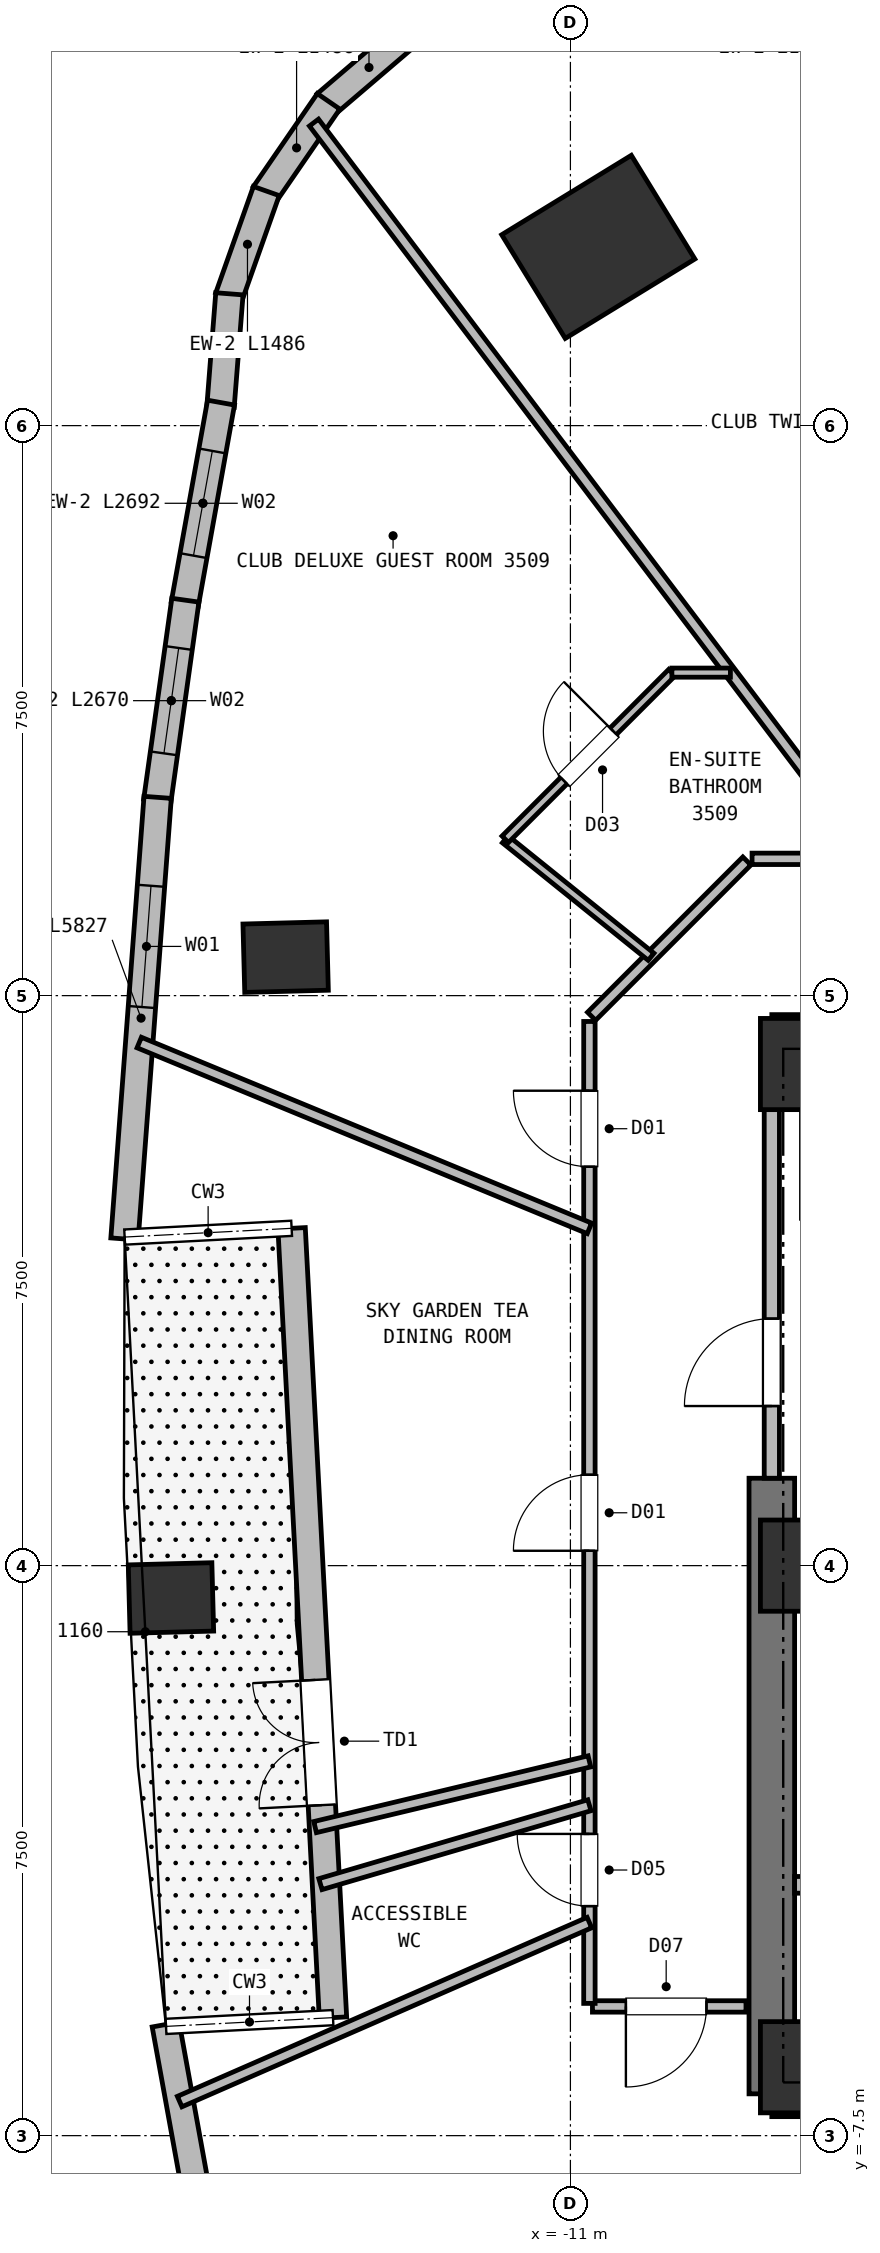
"""IFC4 building model, lengths in metres.
Left out: names, types, materials, properties, quantities, classifications, styles, units other than length and angle.
Written with IfcOpenShell. Run it as: python <this file> out.ifc"""

import sys

from ifc_helpers import new_model, si_unit, direction, frame, frame_2d, origin, origin_2d, place, context, subcontext, project, spatial, rectangle, extrude, element, fill, save


model = new_model("IFC4")
c1 = context("Model", 3, precision=1e-05, world=origin(), true_north=direction((0.0, 1.0)))
c2 = subcontext(c1, "Body", "Model", "MODEL_VIEW")
j1 = project(units=[si_unit("LENGTHUNIT", "METRE"), si_unit("PLANEANGLEUNIT", "RADIAN")], contexts=[c1])
p1 = place(None, origin())
s1 = spatial("IfcSite", under=j1, at=p1, CompositionType="ELEMENT")
p2 = place(p1, origin())
s2 = spatial("IfcBuilding", under=s1, at=p2, CompositionType="ELEMENT")
p3 = place(p2, frame((0.0, 0.0, 131.0)))
s3 = spatial("IfcBuildingStorey", under=s2, at=p3, CompositionType="ELEMENT", Elevation=131.0)
for number, where, z_axis, x_axis in (
    (1, (-8.0, -6.6, 0.0), (0.0, 0.0, 1.0), (1.0, 0.0, 0.0)),
    (2, (-8.0, 6.6, 0.0), (0.0, 0.0, 1.0), (1.0, 0.0, 0.0)),
    (3, (-8.0, 0.0, 0.0), (0.0, 0.0, 1.0), (1.0, 0.0, 0.0)),
):
    element("IfcColumn", number, at=place(p3, frame(where, z_axis=z_axis, x_axis=x_axis)), inside=s3, PredefinedType="COLUMN", context=c2, shape_type="SweptSolid", body=[
        extrude(rectangle(XDim=1.0, YDim=1.2, at=origin_2d()), origin(), (0.0, 0.0, 1.0), 3.75),
    ])
p4 = place(p3, frame((-8.35, 6.95, 0.0), z_axis=(0.0, 0.0, 1.0), x_axis=(1.0, 0.0, 0.0)))
e4 = element("IfcWall", 4, at=p4, inside=s3, PredefinedType="SHEAR", context=c2, shape_type="SweptSolid", body=[
    extrude(rectangle(XDim=16.7, YDim=0.6, at=frame_2d((8.35, 0.0))), origin(), (0.0, 0.0, 1.0), 3.5),
])
p5 = place(p3, frame((-8.35, -6.95, 0.0), z_axis=(0.0, 0.0, 1.0), x_axis=(1.0, 0.0, 0.0)))
e5 = element("IfcWall", 5, at=p5, inside=s3, PredefinedType="SHEAR", context=c2, shape_type="SweptSolid", body=[
    extrude(rectangle(XDim=3.95, YDim=0.6, at=frame_2d((1.975, 0.0))), origin(), (0.0, 0.0, 1.0), 3.5),
])
p6 = place(p3, frame((-8.35, -6.95, 0.0), z_axis=(0.0, 0.0, 1.0), x_axis=(0.0, 1.0, 0.0)))
e6 = element("IfcWall", 6, at=p6, inside=s3, PredefinedType="SHEAR", context=c2, shape_type="SweptSolid", body=[
    extrude(rectangle(XDim=8.1, YDim=0.6, at=frame_2d((4.05, 0.0))), origin(), (0.0, 0.0, 1.0), 3.5),
])
p7 = place(p3, frame((-10.633, 17.352, 0.0), z_axis=(0.0, 0.0, 1.0), x_axis=(-0.522498564716, 0.852640164354, 0.0)))
e7 = element("IfcColumn", 7, at=p7, inside=s3, PredefinedType="COLUMN", context=c2, shape_type="SweptSolid", body=[
    extrude(rectangle(XDim=1.6, YDim=2.0, at=origin_2d()), origin(), (0.0, 0.0, 1.0), 3.75),
])
for number, where, z_axis, x_axis in (
    (8, (-14.747, 8.007, 0.0), (0.0, 0.0, 1.0), (-0.026, 1.0, 0.0)),
    (9, (-16.255, -0.426, 0.0), (0.0, 0.0, 1.0), (-0.026, 1.0, 0.0)),
):
    element("IfcColumn", number, at=place(p3, frame(where, z_axis=z_axis, x_axis=x_axis)), inside=s3, PredefinedType="COLUMN", context=c2, shape_type="SweptSolid", body=[
        extrude(rectangle(XDim=0.9, YDim=1.1, at=origin_2d()), origin(), (0.0, 0.0, 1.0), 3.75),
    ])
p8 = place(p3, frame((-14.124, -5.947, 0.0), z_axis=(0.0, 0.0, 1.0), x_axis=(-0.052325961458, 0.998630058509, 0.0)))
e10 = element("IfcWall", 10, at=p8, inside=s3, PredefinedType="SOLIDWALL", context=c2, shape_type="SweptSolid", body=[
    extrude(rectangle(XDim=10.4, YDim=0.36, at=frame_2d((5.2, 0.0))), origin(), (0.0, 0.0, 1.0), 3.5),
])
p9 = place(p8, frame((2.8, 0.0, 0.0)))
e11 = element("IfcOpeningElement", 11, at=p9, cuts=e10, PredefinedType="OPENING", context=c2, shape_type="SweptSolid", body=[
    extrude(rectangle(XDim=1.65, YDim=2.25, at=frame_2d((0.825, 1.125))), frame((0.0, 0.19, 0.0), z_axis=(0.0, -1.0, 0.0), x_axis=(1.0, 0.0, 0.0)), (0.0, 0.0, 1.0), 0.38),
])
p10 = place(p3, frame((-14.215, 19.23, 0.0), z_axis=(0.0, 0.0, 1.0), x_axis=(0.760461582144, 0.649382924078, 0.0)))
e12 = element("IfcWall", 12, at=p10, inside=s3, PredefinedType="SOLIDWALL", context=c2, shape_type="SweptSolid", body=[
    extrude(rectangle(XDim=1.486, YDim=0.36, at=frame_2d((0.743, 0.0))), origin(), (0.0, 0.0, 1.0), 3.5),
])
p11 = place(p3, frame((-15.023, 18.042, 0.0), z_axis=(0.0, 0.0, 1.0), x_axis=(0.566438155808, 0.824104250472, 0.0)))
e13 = element("IfcWall", 13, at=p11, inside=s3, PredefinedType="SOLIDWALL", context=c2, shape_type="SweptSolid", body=[
    extrude(rectangle(XDim=1.486, YDim=0.36, at=frame_2d((0.743, 0.0))), origin(), (0.0, 0.0, 1.0), 3.5),
])
p12 = place(p3, frame((-15.497, 16.686, 0.0), z_axis=(0.0, 0.0, 1.0), x_axis=(0.333670746008, 0.942689680254, 0.0)))
e14 = element("IfcWall", 14, at=p12, inside=s3, PredefinedType="SOLIDWALL", context=c2, shape_type="SweptSolid", body=[
    extrude(rectangle(XDim=1.486, YDim=0.36, at=frame_2d((0.743, 0.0))), origin(), (0.0, 0.0, 1.0), 3.5),
])
p13 = place(p3, frame((-15.603, 15.253, 0.0), z_axis=(0.0, 0.0, 1.0), x_axis=(0.078393018091, 0.996922531952, 0.0)))
e15 = element("IfcWall", 15, at=p13, inside=s3, PredefinedType="SOLIDWALL", context=c2, shape_type="SweptSolid", body=[
    extrude(rectangle(XDim=1.486, YDim=0.36, at=frame_2d((0.743, 0.0))), origin(), (0.0, 0.0, 1.0), 3.5),
])
p14 = place(p3, frame((-16.073, 12.654, 0.0), z_axis=(0.0, 0.0, 1.0), x_axis=(0.177152998315, 0.984183323974, 0.0)))
e16 = element("IfcWall", 16, at=p14, inside=s3, PredefinedType="SOLIDWALL", context=c2, shape_type="SweptSolid", body=[
    extrude(rectangle(XDim=2.691, YDim=0.36, at=frame_2d((1.346, 0.0))), origin(), (0.0, 0.0, 1.0), 3.5),
])
p15 = place(p14, frame((0.646, 0.0, 0.72)))
e17 = element("IfcOpeningElement", 17, at=p15, cuts=e16, PredefinedType="OPENING", context=c2, shape_type="SweptSolid", body=[
    extrude(rectangle(XDim=1.4, YDim=1.84, at=frame_2d((0.7, 0.92))), frame((0.0, 0.19, 0.0), z_axis=(0.0, -1.0, 0.0), x_axis=(1.0, 0.0, 0.0)), (0.0, 0.0, 1.0), 0.38),
])
p16 = place(p3, frame((-16.436, 10.059, 0.0), z_axis=(0.0, 0.0, 1.0), x_axis=(0.138719592598, 0.990331699296, 0.0)))
e18 = element("IfcWall", 18, at=p16, inside=s3, PredefinedType="SOLIDWALL", context=c2, shape_type="SweptSolid", body=[
    extrude(rectangle(XDim=2.67, YDim=0.36, at=frame_2d((1.335, 0.0))), origin(), (0.0, 0.0, 1.0), 3.5),
])
p17 = place(p16, frame((0.635, 0.0, 0.72)))
e19 = element("IfcOpeningElement", 19, at=p17, cuts=e18, PredefinedType="OPENING", context=c2, shape_type="SweptSolid", body=[
    extrude(rectangle(XDim=1.4, YDim=1.84, at=frame_2d((0.7, 0.92))), frame((0.0, 0.19, 0.0), z_axis=(0.0, -1.0, 0.0), x_axis=(1.0, 0.0, 0.0)), (0.0, 0.0, 1.0), 0.38),
])
p18 = place(p3, frame((-16.867, 4.298, 0.0), z_axis=(0.0, 0.0, 1.0), x_axis=(0.074873276991, 0.997193056731, 0.0)))
e20 = element("IfcWall", 20, at=p18, inside=s3, PredefinedType="SOLIDWALL", context=c2, shape_type="SweptSolid", body=[
    extrude(rectangle(XDim=5.827, YDim=0.36, at=frame_2d((2.914, 0.0))), origin(), (0.0, 0.0, 1.0), 3.5),
])
p19 = place(p18, frame((3.06, 0.0, 0.72)))
e21 = element("IfcOpeningElement", 21, at=p19, cuts=e20, PredefinedType="OPENING", context=c2, shape_type="SweptSolid", body=[
    extrude(rectangle(XDim=1.6, YDim=1.88, at=frame_2d((0.8, 0.94))), frame((0.0, 0.19, 0.0), z_axis=(0.0, -1.0, 0.0), x_axis=(1.0, 0.0, 0.0)), (0.0, 0.0, 1.0), 0.38),
])
p20 = place(p3, frame((-15.284, -11.771, 0.0), z_axis=(0.0, 0.0, 1.0), x_axis=(-0.178697394158, 0.983904081362, 0.0)))
e22 = element("IfcWall", 22, at=p20, inside=s3, PredefinedType="SOLIDWALL", context=c2, shape_type="SweptSolid", body=[
    extrude(rectangle(XDim=5.827, YDim=0.36, at=frame_2d((2.914, 0.0))), origin(), (0.0, 0.0, 1.0), 3.5),
])
p21 = place(p20, frame((2.113, 0.0, 0.72)))
e23 = element("IfcOpeningElement", 23, at=p21, cuts=e22, PredefinedType="OPENING", context=c2, shape_type="SweptSolid", body=[
    extrude(rectangle(XDim=1.6, YDim=1.88, at=frame_2d((0.8, 0.94))), frame((0.0, 0.19, 0.0), z_axis=(0.0, -1.0, 0.0), x_axis=(1.0, 0.0, 0.0)), (0.0, 0.0, 1.0), 0.38),
])
p22 = place(p3, frame((-8.05, -4.2, 0.0), z_axis=(0.0, 0.0, 1.0), x_axis=(1.0, 0.0, 0.0)))
e24 = element("IfcWall", 24, at=p22, inside=s3, PredefinedType="PARTITIONING", context=c2, shape_type="SweptSolid", body=[
    extrude(rectangle(XDim=0.96, YDim=0.22, at=frame_2d((0.48, 0.0))), origin(), (0.0, 0.0, 1.0), 3.5),
])
p23 = place(p3, frame((-8.35, 1.15, 0.0), z_axis=(0.0, 0.0, 1.0), x_axis=(0.0, 1.0, 0.0)))
e25 = element("IfcWall", 25, at=p23, inside=s3, PredefinedType="PARTITIONING", context=c2, shape_type="SweptSolid", body=[
    extrude(rectangle(XDim=5.4, YDim=0.2, at=frame_2d((2.7, 0.0))), origin(), (0.0, 0.0, 1.0), 3.5),
])
p24 = place(p23, frame((0.95, 0.0, 0.0)))
e26 = element("IfcOpeningElement", 26, at=p24, cuts=e25, PredefinedType="OPENING", context=c2, shape_type="SweptSolid", body=[
    extrude(rectangle(XDim=1.15, YDim=2.15, at=frame_2d((0.575, 1.075))), frame((0.0, 0.11, 0.0), z_axis=(0.0, -1.0, 0.0), x_axis=(1.0, 0.0, 0.0)), (0.0, 0.0, 1.0), 0.22),
])
p25 = place(p3, frame((-8.69, -5.8, 0.0), z_axis=(0.0, 0.0, 1.0), x_axis=(-1.0, 0.0, 0.0)))
e27 = element("IfcWall", 27, at=p25, inside=s3, PredefinedType="PARTITIONING", context=c2, shape_type="SweptSolid", body=[
    extrude(rectangle(XDim=2.02, YDim=0.15, at=frame_2d((1.01, 0.0))), origin(), (0.0, 0.0, 1.0), 3.5),
])
p26 = place(p25, frame((0.52, 0.0, 0.0)))
e28 = element("IfcOpeningElement", 28, at=p26, cuts=e27, PredefinedType="OPENING", context=c2, shape_type="SweptSolid", body=[
    extrude(rectangle(XDim=1.06, YDim=2.15, at=frame_2d((0.53, 1.075))), frame((0.0, 0.085, 0.0), z_axis=(0.0, -1.0, 0.0), x_axis=(1.0, 0.0, 0.0)), (0.0, 0.0, 1.0), 0.17),
])
p27 = place(p3, frame((-8.61, 9.3, 0.0), z_axis=(0.0, 0.0, 1.0), x_axis=(1.0, 0.0, 0.0)))
e29 = element("IfcWall", 29, at=p27, inside=s3, PredefinedType="PARTITIONING", context=c2, shape_type="SweptSolid", body=[
    extrude(rectangle(XDim=17.22, YDim=0.15, at=frame_2d((8.61, 0.0))), origin(), (0.0, 0.0, 1.0), 3.5),
])
p28 = place(p27, frame((11.156, 0.0, 0.0)))
e30 = element("IfcOpeningElement", 30, at=p28, cuts=e29, PredefinedType="OPENING", context=c2, shape_type="SweptSolid", body=[
    extrude(rectangle(XDim=1.0, YDim=2.15, at=frame_2d((0.5, 1.075))), frame((0.0, 0.085, 0.0), z_axis=(0.0, -1.0, 0.0), x_axis=(1.0, 0.0, 0.0)), (0.0, 0.0, 1.0), 0.17),
])
p29 = place(p27, frame((6.799, 0.0, 0.0)))
e31 = element("IfcOpeningElement", 31, at=p29, cuts=e29, PredefinedType="OPENING", context=c2, shape_type="SweptSolid", body=[
    extrude(rectangle(XDim=1.06, YDim=2.15, at=frame_2d((0.53, 1.075))), frame((0.0, 0.085, 0.0), z_axis=(0.0, -1.0, 0.0), x_axis=(1.0, 0.0, 0.0)), (0.0, 0.0, 1.0), 0.17),
])
p30 = place(p27, frame((1.737, 0.0, 0.0)))
e32 = element("IfcOpeningElement", 32, at=p30, cuts=e29, PredefinedType="OPENING", context=c2, shape_type="SweptSolid", body=[
    extrude(rectangle(XDim=1.06, YDim=2.15, at=frame_2d((0.53, 1.075))), frame((0.0, 0.085, 0.0), z_axis=(0.0, -1.0, 0.0), x_axis=(1.0, 0.0, 0.0)), (0.0, 0.0, 1.0), 0.17),
])
p31 = place(p27, frame((8.48, 0.0, 0.0)))
e33 = element("IfcOpeningElement", 33, at=p31, cuts=e29, PredefinedType="OPENING", context=c2, shape_type="SweptSolid", body=[
    extrude(rectangle(XDim=1.0, YDim=2.15, at=frame_2d((0.5, 1.075))), frame((0.0, 0.085, 0.0), z_axis=(0.0, -1.0, 0.0), x_axis=(1.0, 0.0, 0.0)), (0.0, 0.0, 1.0), 0.17),
])
p32 = place(p3, frame((-10.722, 7.228, 0.0), z_axis=(0.0, 0.0, 1.0), x_axis=(0.707106781187, 0.707106781187, 0.0)))
e34 = element("IfcWall", 34, at=p32, inside=s3, PredefinedType="PARTITIONING", context=c2, shape_type="SweptSolid", body=[
    extrude(rectangle(XDim=2.89, YDim=0.15, at=frame_2d((1.445, 0.0))), origin(), (0.0, 0.0, 1.0), 3.5),
])
p33 = place(p3, frame((-10.75, -5.76, 0.0), z_axis=(0.0, 0.0, 1.0), x_axis=(0.0, 1.0, 0.0)))
e35 = element("IfcWall", 35, at=p33, inside=s3, PredefinedType="PARTITIONING", context=c2, shape_type="SweptSolid", body=[
    extrude(rectangle(XDim=12.92, YDim=0.15, at=frame_2d((6.46, 0.0))), origin(), (0.0, 0.0, 1.0), 3.5),
])
p34 = place(p33, frame((1.28, 0.0, 0.0)))
e36 = element("IfcOpeningElement", 36, at=p34, cuts=e35, PredefinedType="OPENING", context=c2, shape_type="SweptSolid", body=[
    extrude(rectangle(XDim=0.95, YDim=2.1, at=frame_2d((0.475, 1.05))), frame((0.0, 0.085, 0.0), z_axis=(0.0, -1.0, 0.0), x_axis=(1.0, 0.0, 0.0)), (0.0, 0.0, 1.0), 0.17),
])
p35 = place(p33, frame((5.956, 0.0, 0.0)))
e37 = element("IfcOpeningElement", 37, at=p35, cuts=e35, PredefinedType="OPENING", context=c2, shape_type="SweptSolid", body=[
    extrude(rectangle(XDim=1.0, YDim=2.15, at=frame_2d((0.5, 1.075))), frame((0.0, 0.085, 0.0), z_axis=(0.0, -1.0, 0.0), x_axis=(1.0, 0.0, 0.0)), (0.0, 0.0, 1.0), 0.17),
])
p36 = place(p33, frame((11.009, 0.0, 0.0)))
e38 = element("IfcOpeningElement", 38, at=p36, cuts=e35, PredefinedType="OPENING", context=c2, shape_type="SweptSolid", body=[
    extrude(rectangle(XDim=1.0, YDim=2.15, at=frame_2d((0.5, 1.075))), frame((0.0, 0.085, 0.0), z_axis=(0.0, -1.0, 0.0), x_axis=(1.0, 0.0, 0.0)), (0.0, 0.0, 1.0), 0.17),
])
p37 = place(p3, frame((-10.75, -4.697, 0.0), z_axis=(0.0, 0.0, 1.0), x_axis=(-0.916368645406, -0.400335491452, 0.0)))
e39 = element("IfcWall", 39, at=p37, inside=s3, PredefinedType="PARTITIONING", context=c2, shape_type="SweptSolid", body=[
    extrude(rectangle(XDim=5.883, YDim=0.15, at=frame_2d((2.941, 0.0))), origin(), (0.0, 0.0, 1.0), 3.5),
])
p38 = place(p3, frame((-7.04, 9.3, 0.0), z_axis=(0.0, 0.0, 1.0), x_axis=(-0.603569047372, 0.797310733061, 0.0)))
e40 = element("IfcWall", 40, at=p38, inside=s3, PredefinedType="PARTITIONING", context=c2, shape_type="SweptSolid", body=[
    extrude(rectangle(XDim=12.15, YDim=0.15, at=frame_2d((6.075, 0.0))), origin(), (0.0, 0.0, 1.0), 3.5),
])
p39 = place(p3, frame((-11.857, 9.558, 0.0), z_axis=(0.0, 0.0, 1.0), x_axis=(0.778601964437, -0.627518112069, 0.0)))
e41 = element("IfcWall", 41, at=p39, inside=s3, PredefinedType="PARTITIONING", context=c2, shape_type="SweptSolid", body=[
    extrude(rectangle(XDim=2.464, YDim=0.12, at=frame_2d((1.232, 0.0))), origin(), (0.0, 0.0, 1.0), 3.5),
])
p40 = place(p3, frame((-11.857, 9.558, 0.0), z_axis=(0.0, 0.0, 1.0), x_axis=(0.7071461491, 0.707067411081, 0.0)))
e42 = element("IfcWall", 42, at=p40, inside=s3, PredefinedType="PARTITIONING", context=c2, shape_type="SweptSolid", body=[
    extrude(rectangle(XDim=3.101, YDim=0.12, at=frame_2d((1.55, 0.0))), origin(), (0.0, 0.0, 1.0), 3.5),
])
p41 = place(p40, frame((1.09, 0.0, 0.0)))
e43 = element("IfcOpeningElement", 43, at=p41, cuts=e42, PredefinedType="OPENING", context=c2, shape_type="SweptSolid", body=[
    extrude(rectangle(XDim=0.92, YDim=2.1, at=frame_2d((0.46, 1.05))), frame((0.0, 0.07, 0.0), z_axis=(0.0, -1.0, 0.0), x_axis=(1.0, 0.0, 0.0)), (0.0, 0.0, 1.0), 0.14),
])
p42 = place(p3, frame((-8.895, 11.75, 0.0), z_axis=(0.0, 0.0, 1.0), x_axis=(-1.0, 0.0, 0.0)))
e44 = element("IfcWall", 44, at=p42, inside=s3, PredefinedType="PARTITIONING", context=c2, shape_type="SweptSolid", body=[
    extrude(rectangle(XDim=0.77, YDim=0.12, at=frame_2d((0.385, 0.0))), origin(), (0.0, 0.0, 1.0), 3.5),
])
p43 = place(p3, frame((-10.75, 4.438, 0.0), z_axis=(0.0, 0.0, 1.0), x_axis=(-0.924334473985, 0.381583254615, 0.0)))
e45 = element("IfcWall", 45, at=p43, inside=s3, PredefinedType="PARTITIONING", context=c2, shape_type="SweptSolid", body=[
    extrude(rectangle(XDim=6.408, YDim=0.15, at=frame_2d((3.204, 0.0))), origin(), (0.0, 0.0, 1.0), 3.5),
])
p44 = place(p3, frame((-10.75, -3.153, 0.0), z_axis=(0.0, 0.0, 1.0), x_axis=(-0.959579233132, -0.281438617362, 0.0)))
e46 = element("IfcWall", 46, at=p44, inside=s3, PredefinedType="PARTITIONING", context=c2, shape_type="SweptSolid", body=[
    extrude(rectangle(XDim=3.688, YDim=0.15, at=frame_2d((1.844, 0.0))), origin(), (0.0, 0.0, 1.0), 3.5),
])
p45 = place(p3, frame((-10.75, -2.575, 0.0), z_axis=(0.0, 0.0, 1.0), x_axis=(-0.972472035097, -0.233019614958, 0.0)))
e47 = element("IfcWall", 47, at=p45, inside=s3, PredefinedType="PARTITIONING", context=c2, shape_type="SweptSolid", body=[
    extrude(rectangle(XDim=3.711, YDim=0.15, at=frame_2d((1.855, 0.0))), origin(), (0.0, 0.0, 1.0), 3.5),
])
p46 = place(p9, origin())
e48 = element("IfcDoor", 48, at=p46, inside=s3, OperationType="DOUBLE_DOOR_SINGLE_SWING", PredefinedType="DOOR", context=c2, shape_type="SweptSolid", body=[
    extrude(rectangle(XDim=1.65, YDim=2.25, at=frame_2d((0.825, 1.125))), frame((0.0, 0.025, 0.0), z_axis=(0.0, -1.0, 0.0), x_axis=(1.0, 0.0, 0.0)), (0.0, 0.0, 1.0), 0.05),
])
fill(e11, e48)
p47 = place(p15, origin())
e49 = element("IfcWindow", 49, at=p47, inside=s3, PartitioningType="SINGLE_PANEL", PredefinedType="WINDOW", context=c2, shape_type="SweptSolid", body=[
    extrude(rectangle(XDim=1.4, YDim=1.84, at=frame_2d((0.7, 0.92))), frame((0.0, 0.03, 0.0), z_axis=(0.0, -1.0, 0.0), x_axis=(1.0, 0.0, 0.0)), (0.0, 0.0, 1.0), 0.06),
])
fill(e17, e49)
p48 = place(p17, origin())
e50 = element("IfcWindow", 50, at=p48, inside=s3, PartitioningType="SINGLE_PANEL", PredefinedType="WINDOW", context=c2, shape_type="SweptSolid", body=[
    extrude(rectangle(XDim=1.4, YDim=1.84, at=frame_2d((0.7, 0.92))), frame((0.0, 0.03, 0.0), z_axis=(0.0, -1.0, 0.0), x_axis=(1.0, 0.0, 0.0)), (0.0, 0.0, 1.0), 0.06),
])
fill(e19, e50)
p49 = place(p19, origin())
e51 = element("IfcWindow", 51, at=p49, inside=s3, PartitioningType="SINGLE_PANEL", PredefinedType="WINDOW", context=c2, shape_type="SweptSolid", body=[
    extrude(rectangle(XDim=1.6, YDim=1.88, at=frame_2d((0.8, 0.94))), frame((0.0, 0.03, 0.0), z_axis=(0.0, -1.0, 0.0), x_axis=(1.0, 0.0, 0.0)), (0.0, 0.0, 1.0), 0.06),
])
fill(e21, e51)
p50 = place(p24, origin())
e52 = element("IfcDoor", 52, at=p50, inside=s3, OperationType="SINGLE_SWING_LEFT", PredefinedType="DOOR", context=c2, shape_type="SweptSolid", body=[
    extrude(rectangle(XDim=1.15, YDim=2.15, at=frame_2d((0.575, 1.075))), frame((0.0, 0.025, 0.0), z_axis=(0.0, -1.0, 0.0), x_axis=(1.0, 0.0, 0.0)), (0.0, 0.0, 1.0), 0.05),
])
fill(e26, e52)
p51 = place(p41, origin())
e53 = element("IfcDoor", 53, at=p51, inside=s3, OperationType="SINGLE_SWING_RIGHT", PredefinedType="DOOR", context=c2, shape_type="SweptSolid", body=[
    extrude(rectangle(XDim=0.92, YDim=2.1, at=frame_2d((0.46, 1.05))), frame((0.0, 0.025, 0.0), z_axis=(0.0, -1.0, 0.0), x_axis=(1.0, 0.0, 0.0)), (0.0, 0.0, 1.0), 0.05),
])
fill(e43, e53)
p52 = place(p34, origin())
e54 = element("IfcDoor", 54, at=p52, inside=s3, OperationType="SINGLE_SWING_RIGHT", PredefinedType="DOOR", context=c2, shape_type="SweptSolid", body=[
    extrude(rectangle(XDim=0.95, YDim=2.1, at=frame_2d((0.475, 1.05))), frame((0.0, 0.025, 0.0), z_axis=(0.0, -1.0, 0.0), x_axis=(1.0, 0.0, 0.0)), (0.0, 0.0, 1.0), 0.05),
])
fill(e36, e54)
p53 = place(p35, origin())
e55 = element("IfcDoor", 55, at=p53, inside=s3, OperationType="SINGLE_SWING_LEFT", PredefinedType="DOOR", context=c2, shape_type="SweptSolid", body=[
    extrude(rectangle(XDim=1.0, YDim=2.15, at=frame_2d((0.5, 1.075))), frame((0.0, 0.025, 0.0), z_axis=(0.0, -1.0, 0.0), x_axis=(1.0, 0.0, 0.0)), (0.0, 0.0, 1.0), 0.05),
])
fill(e37, e55)
p54 = place(p36, origin())
e56 = element("IfcDoor", 56, at=p54, inside=s3, OperationType="SINGLE_SWING_RIGHT", PredefinedType="DOOR", context=c2, shape_type="SweptSolid", body=[
    extrude(rectangle(XDim=1.0, YDim=2.15, at=frame_2d((0.5, 1.075))), frame((0.0, 0.025, 0.0), z_axis=(0.0, -1.0, 0.0), x_axis=(1.0, 0.0, 0.0)), (0.0, 0.0, 1.0), 0.05),
])
fill(e38, e56)
p55 = place(p26, origin())
e57 = element("IfcDoor", 57, at=p55, inside=s3, OperationType="SINGLE_SWING_RIGHT", PredefinedType="DOOR", context=c2, shape_type="SweptSolid", body=[
    extrude(rectangle(XDim=1.06, YDim=2.15, at=frame_2d((0.53, 1.075))), frame((0.0, 0.025, 0.0), z_axis=(0.0, -1.0, 0.0), x_axis=(1.0, 0.0, 0.0)), (0.0, 0.0, 1.0), 0.05),
])
fill(e28, e57)
save(model, sys.argv[1])
